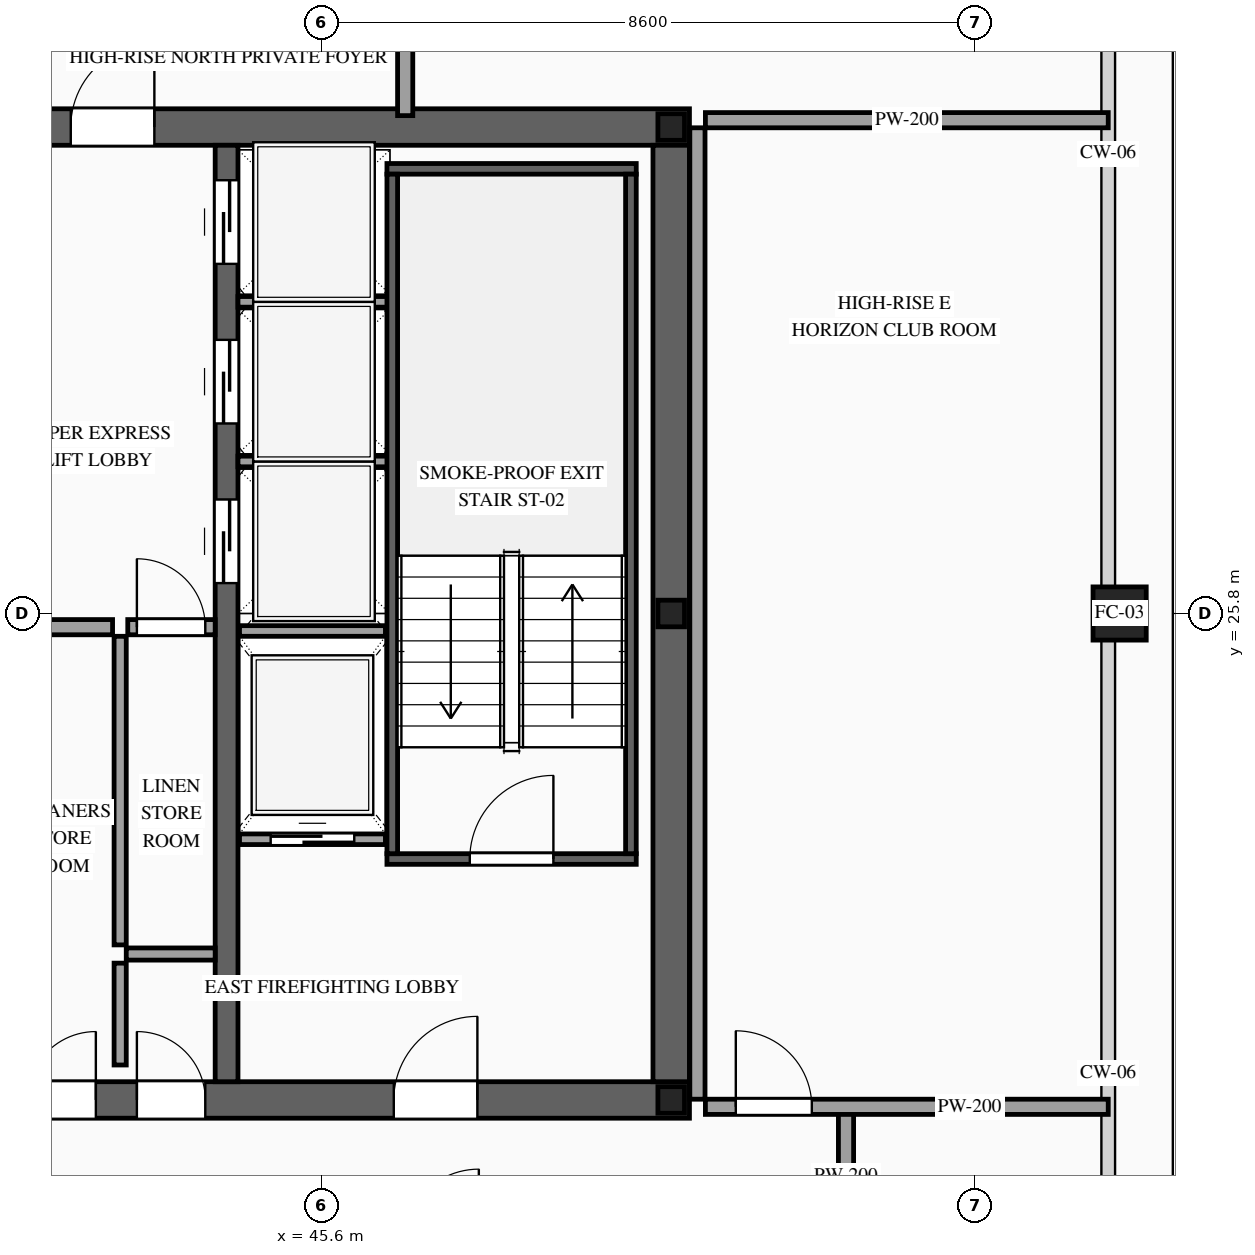
"""IFC4 building model, lengths in metres.
Left out: names, types, materials, properties, quantities, classifications, styles, units other than length and angle.
Written with IfcOpenShell. Run it as: python <this file> out.ifc"""

import sys

from ifc_helpers import new_model, si_unit, direction, frame, frame_2d, origin, origin_2d, place, context, subcontext, project, spatial, rectangle, hollow_rectangle, i_section, extrude, source, transform, mapped, element, fill, save


model = new_model("IFC4")
c1 = context("Model", 3, precision=1e-05, world=origin(), true_north=direction((0.0, 1.0)))
c2 = subcontext(c1, "Body", "Model", "MODEL_VIEW")
j1 = project(units=[si_unit("LENGTHUNIT", "METRE"), si_unit("PLANEANGLEUNIT", "RADIAN")], contexts=[c1])
p1 = place(None, origin())
s1 = spatial("IfcSite", under=j1, at=p1, CompositionType="ELEMENT")
p2 = place(p1, origin())
s2 = spatial("IfcBuilding", under=s1, at=p2, CompositionType="ELEMENT")
p3 = place(p2, frame((0.0, 0.0, 292.6)))
s3 = spatial("IfcBuildingStorey", under=s2, at=p3, CompositionType="ELEMENT", Elevation=292.6)
p4 = place(p3, frame((23.56, 19.4, 0.0), z_axis=(0.0, 0.0, 1.0), x_axis=(1.0, 0.0, 0.0)))
e1 = element("IfcWall", 1, at=p4, inside=s3, PredefinedType="SHEAR", context=c2, shape_type="SweptSolid", body=[
    extrude(rectangle(XDim=26.88, YDim=0.48, at=frame_2d((13.44, 0.0))), origin(), (0.0, 0.0, 1.0), 3.5),
])
p5 = place(p4, frame((1.89, 0.0, 0.0)))
e2 = element("IfcOpeningElement", 2, at=p5, cuts=e1, PredefinedType="OPENING", context=c2, shape_type="SweptSolid", body=[
    extrude(rectangle(XDim=1.1, YDim=2.2, at=frame_2d((0.55, 1.1))), frame((0.0, 0.255, 0.0), z_axis=(0.0, -1.0, 0.0), x_axis=(1.0, 0.0, 0.0)), (0.0, 0.0, 1.0), 0.51),
])
p6 = place(p4, frame((9.79, 0.0, 0.0)))
e3 = element("IfcOpeningElement", 3, at=p6, cuts=e1, PredefinedType="OPENING", context=c2, shape_type="SweptSolid", body=[
    extrude(rectangle(XDim=1.1, YDim=2.2, at=frame_2d((0.55, 1.1))), frame((0.0, 0.255, 0.0), z_axis=(0.0, -1.0, 0.0), x_axis=(1.0, 0.0, 0.0)), (0.0, 0.0, 1.0), 0.51),
])
p7 = place(p4, frame((22.99, 0.0, 0.0)))
e4 = element("IfcOpeningElement", 4, at=p7, cuts=e1, PredefinedType="OPENING", context=c2, shape_type="SweptSolid", body=[
    extrude(rectangle(XDim=1.1, YDim=2.2, at=frame_2d((0.55, 1.1))), frame((0.0, 0.255, 0.0), z_axis=(0.0, -1.0, 0.0), x_axis=(1.0, 0.0, 0.0)), (0.0, 0.0, 1.0), 0.51),
])
p8 = place(p4, frame((19.61, 0.0, 0.0)))
e5 = element("IfcOpeningElement", 5, at=p8, cuts=e1, PredefinedType="OPENING", context=c2, shape_type="SweptSolid", body=[
    extrude(rectangle(XDim=0.9, YDim=2.15, at=frame_2d((0.45, 1.075))), frame((0.0, 0.255, 0.0), z_axis=(0.0, -1.0, 0.0), x_axis=(1.0, 0.0, 0.0)), (0.0, 0.0, 1.0), 0.51),
])
p9 = place(p4, frame((18.17, 0.0, 0.0)))
e6 = element("IfcOpeningElement", 6, at=p9, cuts=e1, PredefinedType="OPENING", context=c2, shape_type="SweptSolid", body=[
    extrude(rectangle(XDim=0.9, YDim=2.15, at=frame_2d((0.45, 1.075))), frame((0.0, 0.255, 0.0), z_axis=(0.0, -1.0, 0.0), x_axis=(1.0, 0.0, 0.0)), (0.0, 0.0, 1.0), 0.51),
])
p10 = place(p3, frame((23.56, 32.2, 0.0), z_axis=(0.0, 0.0, 1.0), x_axis=(1.0, 0.0, 0.0)))
e7 = element("IfcWall", 7, at=p10, inside=s3, PredefinedType="SHEAR", context=c2, shape_type="SweptSolid", body=[
    extrude(rectangle(XDim=26.88, YDim=0.48, at=frame_2d((13.44, 0.0))), origin(), (0.0, 0.0, 1.0), 3.5),
])
p11 = place(p10, frame((4.51, 0.0, 0.0)))
e8 = element("IfcOpeningElement", 8, at=p11, cuts=e7, PredefinedType="OPENING", context=c2, shape_type="SweptSolid", body=[
    extrude(rectangle(XDim=0.9, YDim=2.15, at=frame_2d((0.45, 1.075))), frame((0.0, 0.255, 0.0), z_axis=(0.0, -1.0, 0.0), x_axis=(1.0, 0.0, 0.0)), (0.0, 0.0, 1.0), 0.51),
])
p12 = place(p10, frame((9.79, 0.0, 0.0)))
e9 = element("IfcOpeningElement", 9, at=p12, cuts=e7, PredefinedType="OPENING", context=c2, shape_type="SweptSolid", body=[
    extrude(rectangle(XDim=1.1, YDim=2.2, at=frame_2d((0.55, 1.1))), frame((0.0, 0.255, 0.0), z_axis=(0.0, -1.0, 0.0), x_axis=(1.0, 0.0, 0.0)), (0.0, 0.0, 1.0), 0.51),
])
p13 = place(p10, frame((15.64, 0.0, 0.0)))
e10 = element("IfcOpeningElement", 10, at=p13, cuts=e7, PredefinedType="OPENING", context=c2, shape_type="SweptSolid", body=[
    extrude(rectangle(XDim=1.1, YDim=2.2, at=frame_2d((0.55, 1.1))), frame((0.0, 0.255, 0.0), z_axis=(0.0, -1.0, 0.0), x_axis=(1.0, 0.0, 0.0)), (0.0, 0.0, 1.0), 0.51),
])
p14 = place(p10, frame((18.74, 0.0, 0.0)))
e11 = element("IfcOpeningElement", 11, at=p14, cuts=e7, PredefinedType="OPENING", context=c2, shape_type="SweptSolid", body=[
    extrude(rectangle(XDim=1.1, YDim=2.2, at=frame_2d((0.55, 1.1))), frame((0.0, 0.255, 0.0), z_axis=(0.0, -1.0, 0.0), x_axis=(1.0, 0.0, 0.0)), (0.0, 0.0, 1.0), 0.51),
])
m1 = source(origin(), c2, "Body", "SweptSolid", [
    extrude(rectangle(XDim=12.32, YDim=0.48, at=frame_2d((6.16, 0.0))), origin(), (0.0, 0.0, 1.0), 3.5),
])
p15 = place(p3, frame((50.2, 19.64, 0.0), z_axis=(0.0, 0.0, 1.0), x_axis=(0.0, 1.0, 0.0)))
e12 = element("IfcWall", 12, at=p15, inside=s3, PredefinedType="SHEAR", context=c2, shape_type="MappedRepresentation", body=[
    mapped(m1, transform((0.0, 0.0, 0.0), scale=1.0)),
])
p16 = place(p3, frame((44.35, 19.64, 0.0), z_axis=(0.0, 0.0, 1.0), x_axis=(0.0, 1.0, 0.0)))
e13 = element("IfcWall", 13, at=p16, inside=s3, PredefinedType="SOLIDWALL", context=c2, shape_type="SweptSolid", body=[
    extrude(rectangle(XDim=12.32, YDim=0.3, at=frame_2d((6.16, 0.0))), origin(), (0.0, 0.0, 1.0), 3.5),
])
p17 = place(p16, frame((6.56, 0.0, 0.0)))
e14 = element("IfcOpeningElement", 14, at=p17, cuts=e13, PredefinedType="OPENING", context=c2, shape_type="SweptSolid", body=[
    extrude(rectangle(XDim=1.1, YDim=2.2, at=frame_2d((0.55, 1.1))), frame((0.0, 0.165, 0.0), z_axis=(0.0, -1.0, 0.0), x_axis=(1.0, 0.0, 0.0)), (0.0, 0.0, 1.0), 0.33),
])
p18 = place(p16, frame((8.66, 0.0, 0.0)))
e15 = element("IfcOpeningElement", 15, at=p18, cuts=e13, PredefinedType="OPENING", context=c2, shape_type="SweptSolid", body=[
    extrude(rectangle(XDim=1.1, YDim=2.2, at=frame_2d((0.55, 1.1))), frame((0.0, 0.165, 0.0), z_axis=(0.0, -1.0, 0.0), x_axis=(1.0, 0.0, 0.0)), (0.0, 0.0, 1.0), 0.33),
])
p19 = place(p16, frame((10.76, 0.0, 0.0)))
e16 = element("IfcOpeningElement", 16, at=p19, cuts=e13, PredefinedType="OPENING", context=c2, shape_type="SweptSolid", body=[
    extrude(rectangle(XDim=1.1, YDim=2.2, at=frame_2d((0.55, 1.1))), frame((0.0, 0.165, 0.0), z_axis=(0.0, -1.0, 0.0), x_axis=(1.0, 0.0, 0.0)), (0.0, 0.0, 1.0), 0.33),
])
m2 = source(origin(), c2, "Body", "SweptSolid", [
    extrude(i_section(OverallWidth=0.35, OverallDepth=0.35, WebThickness=0.012, FlangeThickness=0.019, at=origin_2d()), origin(), (0.0, 0.0, 1.0), 3.5),
])
for number, where, z_axis, x_axis in (
    (17, (50.2, 19.4, 0.0), (0.0, 0.0, 1.0), (1.0, 0.0, 0.0)),
    (18, (50.2, 25.8, 0.0), (0.0, 0.0, 1.0), (1.0, 0.0, 0.0)),
    (19, (50.2, 32.2, 0.0), (0.0, 0.0, 1.0), (1.0, 0.0, 0.0)),
):
    element("IfcColumn", number, at=place(p3, frame(where, z_axis=z_axis, x_axis=x_axis)), inside=s3, PredefinedType="COLUMN", context=c2, shape_type="MappedRepresentation", body=[
        mapped(m2, transform((0.0, 0.0, 0.0), scale=1.0)),
    ])
m3 = source(origin(), c2, "Body", "SweptSolid", [
    extrude(hollow_rectangle(XDim=0.7, YDim=0.7, WallThickness=0.032, at=origin_2d()), origin(), (0.0, 0.0, 1.0), 3.5),
])
p20 = place(p3, frame((56.1, 25.8, 0.0), z_axis=(0.0, 0.0, 1.0), x_axis=(1.0, 0.0, 0.0)))
e20 = element("IfcColumn", 20, at=p20, inside=s3, PredefinedType="COLUMN", context=c2, shape_type="MappedRepresentation", body=[
    mapped(m3, transform((0.0, 0.0, 0.0), scale=1.0)),
])
p21 = place(p3, frame((44.52, 22.83, 0.0), z_axis=(0.0, 0.0, 1.0), x_axis=(1.0, 0.0, 0.0)))
e21 = element("IfcWall", 21, at=p21, inside=s3, PredefinedType="SOLIDWALL", context=c2, shape_type="SweptSolid", body=[
    extrude(rectangle(XDim=1.92, YDim=0.14, at=frame_2d((0.96, 0.0))), origin(), (0.0, 0.0, 1.0), 3.28),
])
p22 = place(p21, frame((0.41, 0.0, 0.0)))
e22 = element("IfcOpeningElement", 22, at=p22, cuts=e21, PredefinedType="OPENING", context=c2, shape_type="SweptSolid", body=[
    extrude(rectangle(XDim=1.1, YDim=2.2, at=frame_2d((0.55, 1.1))), frame((0.0, 0.085, 0.0), z_axis=(0.0, -1.0, 0.0), x_axis=(1.0, 0.0, 0.0)), (0.0, 0.0, 1.0), 0.17),
])
m4 = source(origin(), c2, "Body", "SweptSolid", [
    extrude(rectangle(XDim=1.92, YDim=0.14, at=frame_2d((0.96, 0.0))), origin(), (0.0, 0.0, 1.0), 3.28),
])
p23 = place(p3, frame((44.52, 25.57, 0.0), z_axis=(0.0, 0.0, 1.0), x_axis=(1.0, 0.0, 0.0)))
e23 = element("IfcWall", 23, at=p23, inside=s3, PredefinedType="SOLIDWALL", context=c2, shape_type="MappedRepresentation", body=[
    mapped(m4, transform((0.0, 0.0, 0.0), scale=1.0)),
])
m5 = source(origin(), c2, "Body", "SweptSolid", [
    extrude(rectangle(XDim=2.0, YDim=0.14, at=frame_2d((1.0, 0.0))), origin(), (0.0, 0.0, 1.0), 3.28),
])
for number, where, z_axis, x_axis in (
    (24, (44.5, 27.8, 0.0), (0.0, 0.0, 1.0), (1.0, 0.0, 0.0)),
    (25, (44.5, 29.9, 0.0), (0.0, 0.0, 1.0), (1.0, 0.0, 0.0)),
):
    element("IfcWall", number, at=place(p3, frame(where, z_axis=z_axis, x_axis=x_axis)), inside=s3, PredefinedType="SOLIDWALL", context=c2, shape_type="MappedRepresentation", body=[
        mapped(m5, transform((0.0, 0.0, 0.0), scale=1.0)),
    ])
p24 = place(p3, frame((46.46, 22.57, 0.0), z_axis=(0.0, 0.0, 1.0), x_axis=(1.0, 0.0, 0.0)))
e26 = element("IfcWall", 26, at=p24, inside=s3, PredefinedType="SOLIDWALL", context=c2, shape_type="SweptSolid", body=[
    extrude(rectangle(XDim=3.28, YDim=0.14, at=frame_2d((1.64, 0.0))), origin(), (0.0, 0.0, 1.0), 3.28),
])
p25 = place(p24, frame((1.09, 0.0, 0.0)))
e27 = element("IfcOpeningElement", 27, at=p25, cuts=e26, PredefinedType="OPENING", context=c2, shape_type="SweptSolid", body=[
    extrude(rectangle(XDim=1.1, YDim=2.2, at=frame_2d((0.55, 1.1))), frame((0.0, 0.085, 0.0), z_axis=(0.0, -1.0, 0.0), x_axis=(1.0, 0.0, 0.0)), (0.0, 0.0, 1.0), 0.17),
])
m6 = source(origin(), c2, "Body", "SweptSolid", [
    extrude(rectangle(XDim=3.28, YDim=0.14, at=frame_2d((1.64, 0.0))), origin(), (0.0, 0.0, 1.0), 3.28),
])
p26 = place(p3, frame((46.46, 31.65, 0.0), z_axis=(0.0, 0.0, 1.0), x_axis=(1.0, 0.0, 0.0)))
e28 = element("IfcWall", 28, at=p26, inside=s3, PredefinedType="SOLIDWALL", context=c2, shape_type="MappedRepresentation", body=[
    mapped(m6, transform((0.0, 0.0, 0.0), scale=1.0)),
])
m7 = source(origin(), c2, "Body", "SweptSolid", [
    extrude(rectangle(XDim=8.94, YDim=0.14, at=frame_2d((4.47, 0.0))), origin(), (0.0, 0.0, 1.0), 3.28),
])
for number, where, z_axis, x_axis in (
    (29, (46.53, 22.64, 0.0), (0.0, 0.0, 1.0), (0.0, 1.0, 0.0)),
    (30, (49.67, 22.64, 0.0), (0.0, 0.0, 1.0), (0.0, 1.0, 0.0)),
):
    element("IfcWall", number, at=place(p3, frame(where, z_axis=z_axis, x_axis=x_axis)), inside=s3, PredefinedType="SOLIDWALL", context=c2, shape_type="MappedRepresentation", body=[
        mapped(m7, transform((0.0, 0.0, 0.0), scale=1.0)),
    ])
m8 = source(origin(), c2, "Body", "SweptSolid", [
    extrude(rectangle(XDim=1.34, YDim=0.16, at=frame_2d((0.67, 0.0))), origin(), (0.0, 0.0, 1.0), 3.28),
])
p27 = place(p3, frame((42.95, 19.86, 0.0), z_axis=(0.0, 0.0, 1.0), x_axis=(0.0, 1.0, 0.0)))
e31 = element("IfcWall", 31, at=p27, inside=s3, PredefinedType="PARTITIONING", context=c2, shape_type="MappedRepresentation", body=[
    mapped(m8, transform((0.0, 0.0, 0.0), scale=1.0)),
])
m9 = source(origin(), c2, "Body", "SweptSolid", [
    extrude(rectangle(XDim=1.17, YDim=0.16, at=frame_2d((0.585, 0.0))), origin(), (0.0, 0.0, 1.0), 3.28),
])
p28 = place(p3, frame((43.03, 21.32, 0.0), z_axis=(0.0, 0.0, 1.0), x_axis=(1.0, 0.0, 0.0)))
e32 = element("IfcWall", 32, at=p28, inside=s3, PredefinedType="PARTITIONING", context=c2, shape_type="MappedRepresentation", body=[
    mapped(m9, transform((0.0, 0.0, 0.0), scale=1.0)),
])
m10 = source(origin(), c2, "Body", "SweptSolid", [
    extrude(rectangle(XDim=1.35, YDim=0.2, at=frame_2d((0.675, 0.0))), origin(), (0.0, 0.0, 1.0), 3.28),
])
p29 = place(p3, frame((41.5, 25.62, 0.0), z_axis=(0.0, 0.0, 1.0), x_axis=(1.0, 0.0, 0.0)))
e33 = element("IfcWall", 33, at=p29, inside=s3, PredefinedType="PARTITIONING", context=c2, shape_type="MappedRepresentation", body=[
    mapped(m10, transform((0.0, 0.0, 0.0), scale=1.0)),
])
m11 = source(origin(), c2, "Body", "SweptSolid", [
    extrude(rectangle(XDim=4.06, YDim=0.16, at=frame_2d((2.03, 0.0))), origin(), (0.0, 0.0, 1.0), 3.28),
])
p30 = place(p3, frame((42.95, 21.44, 0.0), z_axis=(0.0, 0.0, 1.0), x_axis=(0.0, 1.0, 0.0)))
e34 = element("IfcWall", 34, at=p30, inside=s3, PredefinedType="PARTITIONING", context=c2, shape_type="MappedRepresentation", body=[
    mapped(m11, transform((0.0, 0.0, 0.0), scale=1.0)),
])
p31 = place(p3, frame((43.05, 25.62, 0.0), z_axis=(0.0, 0.0, 1.0), x_axis=(1.0, 0.0, 0.0)))
e35 = element("IfcWall", 35, at=p31, inside=s3, PredefinedType="PARTITIONING", context=c2, shape_type="SweptSolid", body=[
    extrude(rectangle(XDim=1.15, YDim=0.2, at=frame_2d((0.575, 0.0))), origin(), (0.0, 0.0, 1.0), 3.28),
])
p32 = place(p31, frame((0.12, 0.0, 0.0)))
e36 = element("IfcOpeningElement", 36, at=p32, cuts=e35, PredefinedType="OPENING", context=c2, shape_type="SweptSolid", body=[
    extrude(rectangle(XDim=0.9, YDim=2.15, at=frame_2d((0.45, 1.075))), frame((0.0, 0.115, 0.0), z_axis=(0.0, -1.0, 0.0), x_axis=(1.0, 0.0, 0.0)), (0.0, 0.0, 1.0), 0.23),
])
m12 = source(origin(), c2, "Body", "SweptSolid", [
    extrude(rectangle(XDim=1.7, YDim=0.2, at=frame_2d((0.85, 0.0))), origin(), (0.0, 0.0, 1.0), 3.28),
])
for number, where, z_axis, x_axis in (
    (37, (46.7, 32.35, 0.0), (0.0, 0.0, 1.0), (0.0, 1.0, 0.0)),
    (38, (52.5, 17.55, 0.0), (0.0, 0.0, 1.0), (0.0, 1.0, 0.0)),
):
    element("IfcWall", number, at=place(p3, frame(where, z_axis=z_axis, x_axis=x_axis)), inside=s3, PredefinedType="PARTITIONING", context=c2, shape_type="MappedRepresentation", body=[
        mapped(m12, transform((0.0, 0.0, 0.0), scale=1.0)),
    ])
p33 = place(p3, frame((50.65, 19.31, 0.0), z_axis=(0.0, 0.0, 1.0), x_axis=(1.0, 0.0, 0.0)))
e39 = element("IfcWall", 39, at=p33, inside=s3, PredefinedType="PARTITIONING", context=c2, shape_type="SweptSolid", body=[
    extrude(rectangle(XDim=5.3, YDim=0.2, at=frame_2d((2.65, 0.0))), origin(), (0.0, 0.0, 1.0), 2.825),
])
p34 = place(p33, frame((0.4, 0.0, 0.0)))
e40 = element("IfcOpeningElement", 40, at=p34, cuts=e39, PredefinedType="OPENING", context=c2, shape_type="SweptSolid", body=[
    extrude(rectangle(XDim=1.0, YDim=2.2, at=frame_2d((0.5, 1.1))), frame((0.0, 0.115, 0.0), z_axis=(0.0, -1.0, 0.0), x_axis=(1.0, 0.0, 0.0)), (0.0, 0.0, 1.0), 0.23),
])
m13 = source(origin(), c2, "Body", "SweptSolid", [
    extrude(rectangle(XDim=5.3, YDim=0.2, at=frame_2d((2.65, 0.0))), origin(), (0.0, 0.0, 1.0), 2.825),
])
p35 = place(p3, frame((50.65, 32.29, 0.0), z_axis=(0.0, 0.0, 1.0), x_axis=(1.0, 0.0, 0.0)))
e41 = element("IfcWall", 41, at=p35, inside=s3, PredefinedType="PARTITIONING", context=c2, shape_type="MappedRepresentation", body=[
    mapped(m13, transform((0.0, 0.0, 0.0), scale=1.0)),
])
m14 = source(origin(), c2, "Body", "SweptSolid", [
    extrude(rectangle(XDim=12.78, YDim=0.2, at=frame_2d((6.39, 0.0))), origin(), (0.0, 0.0, 1.0), 3.28),
])
p36 = place(p3, frame((50.545, 19.41, 0.0), z_axis=(0.0, 0.0, 1.0), x_axis=(0.0, 1.0, 0.0)))
e42 = element("IfcWall", 42, at=p36, inside=s3, PredefinedType="PARTITIONING", context=c2, shape_type="MappedRepresentation", body=[
    mapped(m14, transform((0.0, 0.0, 0.0), scale=1.0)),
])
m15 = source(origin(), c2, "Body", "SweptSolid", [
    extrude(rectangle(XDim=1.1, YDim=2.2, at=frame_2d((0.55, 1.1))), frame((0.0, 0.025, 0.0), z_axis=(0.0, -1.0, 0.0), x_axis=(1.0, 0.0, 0.0)), (0.0, 0.0, 1.0), 0.05),
])
p37 = place(p22, origin())
e43 = element("IfcDoor", 43, at=p37, inside=s3, OperationType="SLIDING_TO_RIGHT", PredefinedType="DOOR", context=c2, shape_type="MappedRepresentation", body=[
    mapped(m15, transform((0.0, 0.0, 0.0), scale=1.0)),
])
fill(e22, e43)
p38 = place(p17, origin())
e44 = element("IfcDoor", 44, at=p38, inside=s3, OperationType="SLIDING_TO_LEFT", PredefinedType="DOOR", context=c2, shape_type="MappedRepresentation", body=[
    mapped(m15, transform((0.0, 0.0, 0.0), scale=1.0)),
])
fill(e14, e44)
p39 = place(p18, origin())
e45 = element("IfcDoor", 45, at=p39, inside=s3, OperationType="SLIDING_TO_RIGHT", PredefinedType="DOOR", context=c2, shape_type="MappedRepresentation", body=[
    mapped(m15, transform((0.0, 0.0, 0.0), scale=1.0)),
])
fill(e15, e45)
p40 = place(p19, origin())
e46 = element("IfcDoor", 46, at=p40, inside=s3, OperationType="SLIDING_TO_LEFT", PredefinedType="DOOR", context=c2, shape_type="MappedRepresentation", body=[
    mapped(m15, transform((0.0, 0.0, 0.0), scale=1.0)),
])
fill(e16, e46)
m16 = source(origin(), c2, "Body", "SweptSolid", [
    extrude(rectangle(XDim=1.1, YDim=2.2, at=frame_2d((0.55, 1.1))), frame((0.0, 0.025, 0.0), z_axis=(0.0, -1.0, 0.0), x_axis=(1.0, 0.0, 0.0)), (0.0, 0.0, 1.0), 0.05),
])
p41 = place(p25, origin())
e47 = element("IfcDoor", 47, at=p41, inside=s3, OperationType="SINGLE_SWING_RIGHT", PredefinedType="DOOR", context=c2, shape_type="MappedRepresentation", body=[
    mapped(m16, transform((0.0, 0.0, 0.0), scale=1.0)),
])
fill(e27, e47)
p42 = place(p7, origin())
e48 = element("IfcDoor", 48, at=p42, inside=s3, OperationType="SINGLE_SWING_RIGHT", PredefinedType="DOOR", context=c2, shape_type="MappedRepresentation", body=[
    mapped(m16, transform((0.0, 0.0, 0.0), scale=1.0)),
])
fill(e4, e48)
p43 = place(p14, origin())
e49 = element("IfcDoor", 49, at=p43, inside=s3, OperationType="SINGLE_SWING_RIGHT", PredefinedType="DOOR", context=c2, shape_type="MappedRepresentation", body=[
    mapped(m16, transform((0.0, 0.0, 0.0), scale=1.0)),
])
fill(e11, e49)
m17 = source(origin(), c2, "Body", "SweptSolid", [
    extrude(rectangle(XDim=0.9, YDim=2.15, at=frame_2d((0.45, 1.075))), frame((0.0, 0.025, 0.0), z_axis=(0.0, -1.0, 0.0), x_axis=(1.0, 0.0, 0.0)), (0.0, 0.0, 1.0), 0.05),
])
p44 = place(p8, origin())
e50 = element("IfcDoor", 50, at=p44, inside=s3, OperationType="SINGLE_SWING_LEFT", PredefinedType="DOOR", context=c2, shape_type="MappedRepresentation", body=[
    mapped(m17, transform((0.0, 0.0, 0.0), scale=1.0)),
])
fill(e5, e50)
p45 = place(p9, origin())
e51 = element("IfcDoor", 51, at=p45, inside=s3, OperationType="SINGLE_SWING_RIGHT", PredefinedType="DOOR", context=c2, shape_type="MappedRepresentation", body=[
    mapped(m17, transform((0.0, 0.0, 0.0), scale=1.0)),
])
fill(e6, e51)
p46 = place(p32, origin())
e52 = element("IfcDoor", 52, at=p46, inside=s3, OperationType="SINGLE_SWING_LEFT", PredefinedType="DOOR", context=c2, shape_type="MappedRepresentation", body=[
    mapped(m17, transform((0.0, 0.0, 0.0), scale=1.0)),
])
fill(e36, e52)
m18 = source(origin(), c2, "Body", "SweptSolid", [
    extrude(rectangle(XDim=1.0, YDim=2.2, at=frame_2d((0.5, 1.1))), frame((0.0, 0.025, 0.0), z_axis=(0.0, -1.0, 0.0), x_axis=(1.0, 0.0, 0.0)), (0.0, 0.0, 1.0), 0.05),
])
p47 = place(p34, origin())
e53 = element("IfcDoor", 53, at=p47, inside=s3, OperationType="SINGLE_SWING_LEFT", PredefinedType="DOOR", context=c2, shape_type="MappedRepresentation", body=[
    mapped(m18, transform((0.0, 0.0, 0.0), scale=1.0)),
])
fill(e40, e53)
save(model, sys.argv[1])
